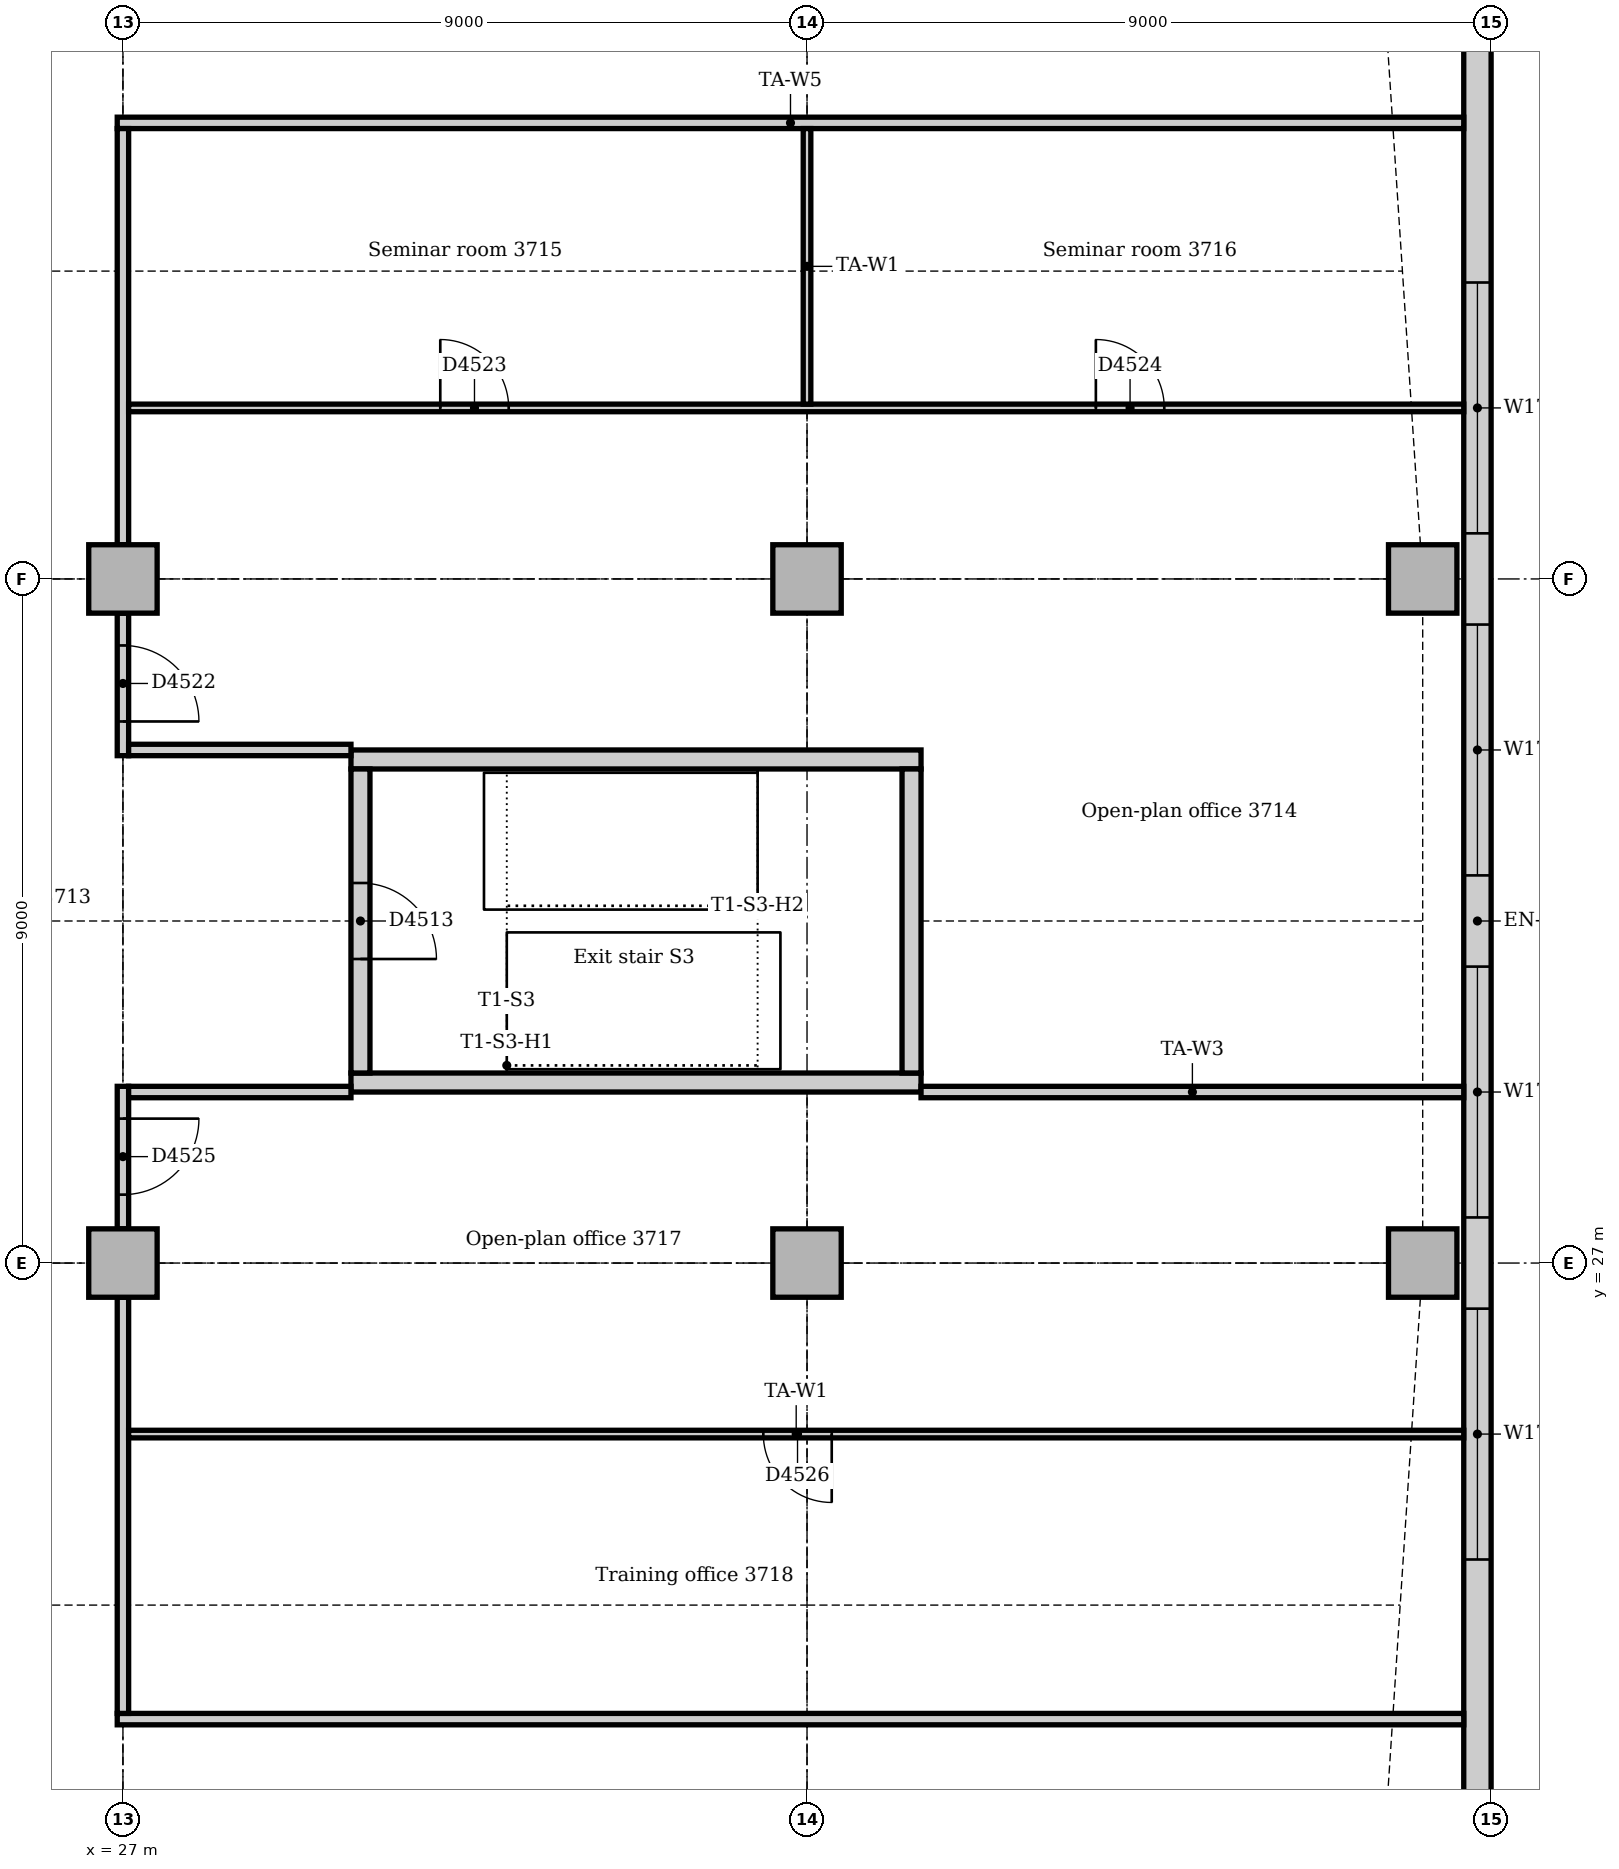
"""IFC4 building model, lengths in metres.
Left out: names, types, materials, properties, quantities, classifications, styles, units other than length and angle.
Written with IfcOpenShell. Run it as: python <this file> out.ifc"""

import sys

from ifc_helpers import new_model, si_unit, direction, frame, frame_2d, origin, origin_2d, place, context, subcontext, project, spatial, rectangle, extrude, element, fill, save


model = new_model("IFC4")
c1 = context("Model", 3, precision=1e-05, world=origin(), true_north=direction((0.0, 1.0)))
c2 = subcontext(c1, "Body", "Model", "MODEL_VIEW")
j1 = project(units=[si_unit("LENGTHUNIT", "METRE"), si_unit("PLANEANGLEUNIT", "RADIAN")], contexts=[c1])
p1 = place(None, origin())
s1 = spatial("IfcSite", under=j1, at=p1, CompositionType="ELEMENT")
p2 = place(p1, origin())
s2 = spatial("IfcBuilding", under=s1, at=p2, CompositionType="ELEMENT")
p3 = place(p2, frame((0.0, 0.0, 157.0)))
s3 = spatial("IfcBuildingStorey", under=s2, at=p3, CompositionType="ELEMENT", Elevation=157.0)
for number, where, z_axis, x_axis in (
    (1, (30.0, 29.375, 0.0), (0.0, 0.0, 1.0), (1.0, 0.0, 0.0)),
    (2, (37.5, 33.625, 0.0), (0.0, 0.0, 1.0), (-1.0, 0.0, 0.0)),
):
    element("IfcWall", number, at=place(p3, frame(where, z_axis=z_axis, x_axis=x_axis)), inside=s3, PredefinedType="SOLIDWALL", context=c2, shape_type="SweptSolid", body=[
        extrude(rectangle(XDim=7.5, YDim=0.25, at=frame_2d((3.75, 0.0))), origin(), (0.0, 0.0, 1.0), 4.0),
    ])
p4 = place(p3, frame((37.375, 29.5, 0.0), z_axis=(0.0, 0.0, 1.0), x_axis=(0.0, 1.0, 0.0)))
e3 = element("IfcWall", 3, at=p4, inside=s3, PredefinedType="SOLIDWALL", context=c2, shape_type="SweptSolid", body=[
    extrude(rectangle(XDim=4.0, YDim=0.25, at=frame_2d((2.0, 0.0))), origin(), (0.0, 0.0, 1.0), 4.0),
])
p5 = place(p3, frame((30.125, 33.5, 0.0), z_axis=(0.0, 0.0, 1.0), x_axis=(0.0, -1.0, 0.0)))
e4 = element("IfcWall", 4, at=p5, inside=s3, PredefinedType="SOLIDWALL", context=c2, shape_type="SweptSolid", body=[
    extrude(rectangle(XDim=4.0, YDim=0.25, at=frame_2d((2.0, 0.0))), origin(), (0.0, 0.0, 1.0), 4.0),
])
p6 = place(p5, frame((1.5, 0.0, 0.0)))
e5 = element("IfcOpeningElement", 5, at=p6, cuts=e4, PredefinedType="OPENING", context=c2, shape_type="SweptSolid", body=[
    extrude(rectangle(XDim=1.0, YDim=2.1, at=frame_2d((0.5, 1.05))), frame((0.0, 0.135, 0.0), z_axis=(0.0, -1.0, 0.0), x_axis=(1.0, 0.0, 0.0)), (0.0, 0.0, 1.0), 0.27),
])
for number, where, z_axis, x_axis in (
    (6, (44.1, 27.0, 0.0), (0.0, 0.0, 1.0), (1.0, 0.0, 0.0)),
    (7, (44.1, 36.0, 0.0), (0.0, 0.0, 1.0), (1.0, 0.0, 0.0)),
    (8, (27.0, 27.0, 0.0), (0.0, 0.0, 1.0), (1.0, 0.0, 0.0)),
    (9, (27.0, 36.0, 0.0), (0.0, 0.0, 1.0), (1.0, 0.0, 0.0)),
    (10, (36.0, 27.0, 0.0), (0.0, 0.0, 1.0), (1.0, 0.0, 0.0)),
    (11, (36.0, 36.0, 0.0), (0.0, 0.0, 1.0), (1.0, 0.0, 0.0)),
):
    element("IfcColumn", number, at=place(p3, frame(where, z_axis=z_axis, x_axis=x_axis)), inside=s3, PredefinedType="COLUMN", context=c2, shape_type="SweptSolid", body=[
        extrude(rectangle(XDim=0.9, YDim=0.9, at=origin_2d()), origin(), (0.0, 0.0, 1.0), 3.85),
    ])
p7 = place(p3, frame((44.82, 19.243, 0.0), z_axis=(0.0, 0.0, 1.0), x_axis=(0.0, 1.0, 0.0)))
e12 = element("IfcWall", 12, at=p7, inside=s3, PredefinedType="STANDARD", context=c2, shape_type="SweptSolid", body=[
    extrude(rectangle(XDim=24.515, YDim=0.36, at=frame_2d((12.257, 0.0))), origin(), (0.0, 0.0, 1.0), 3.85),
])
p8 = place(p7, frame((3.857, 0.0, 0.9)))
e13 = element("IfcOpeningElement", 13, at=p8, cuts=e12, PredefinedType="OPENING", context=c2, shape_type="SweptSolid", body=[
    extrude(rectangle(XDim=3.3, YDim=1.6, at=frame_2d((1.65, 0.8))), frame((0.0, 0.19, 0.0), z_axis=(0.0, -1.0, 0.0), x_axis=(1.0, 0.0, 0.0)), (0.0, 0.0, 1.0), 0.38),
])
p9 = place(p7, frame((8.357, 0.0, 0.9)))
e14 = element("IfcOpeningElement", 14, at=p9, cuts=e12, PredefinedType="OPENING", context=c2, shape_type="SweptSolid", body=[
    extrude(rectangle(XDim=3.3, YDim=1.6, at=frame_2d((1.65, 0.8))), frame((0.0, 0.19, 0.0), z_axis=(0.0, -1.0, 0.0), x_axis=(1.0, 0.0, 0.0)), (0.0, 0.0, 1.0), 0.38),
])
p10 = place(p7, frame((12.857, 0.0, 0.9)))
e15 = element("IfcOpeningElement", 15, at=p10, cuts=e12, PredefinedType="OPENING", context=c2, shape_type="SweptSolid", body=[
    extrude(rectangle(XDim=3.3, YDim=1.6, at=frame_2d((1.65, 0.8))), frame((0.0, 0.19, 0.0), z_axis=(0.0, -1.0, 0.0), x_axis=(1.0, 0.0, 0.0)), (0.0, 0.0, 1.0), 0.38),
])
p11 = place(p7, frame((17.357, 0.0, 0.9)))
e16 = element("IfcOpeningElement", 16, at=p11, cuts=e12, PredefinedType="OPENING", context=c2, shape_type="SweptSolid", body=[
    extrude(rectangle(XDim=3.3, YDim=1.6, at=frame_2d((1.65, 0.8))), frame((0.0, 0.19, 0.0), z_axis=(0.0, -1.0, 0.0), x_axis=(1.0, 0.0, 0.0)), (0.0, 0.0, 1.0), 0.38),
])
for number, where, z_axis, x_axis in (
    (17, (26.925, 21.0, 0.0), (0.0, 0.0, 1.0), (1.0, 0.0, 0.0)),
    (18, (26.925, 42.0, 0.0), (0.0, 0.0, 1.0), (1.0, 0.0, 0.0)),
):
    element("IfcWall", number, at=place(p3, frame(where, z_axis=z_axis, x_axis=x_axis)), inside=s3, PredefinedType="PARTITIONING", context=c2, shape_type="SweptSolid", body=[
        extrude(rectangle(XDim=17.715, YDim=0.15, at=frame_2d((8.857, 0.0))), origin(), (0.0, 0.0, 1.0), 3.85),
    ])
p12 = place(p3, frame((27.0, 21.075, 0.0), z_axis=(0.0, 0.0, 1.0), x_axis=(0.0, 1.0, 0.0)))
e19 = element("IfcWall", 19, at=p12, inside=s3, PredefinedType="PARTITIONING", context=c2, shape_type="SweptSolid", body=[
    extrude(rectangle(XDim=5.475, YDim=0.15, at=frame_2d((2.737, 0.0))), origin(), (0.0, 0.0, 1.0), 3.362),
])
p13 = place(p3, frame((27.0, 27.45, 0.0), z_axis=(0.0, 0.0, 1.0), x_axis=(0.0, 1.0, 0.0)))
e20 = element("IfcWall", 20, at=p13, inside=s3, PredefinedType="PARTITIONING", context=c2, shape_type="SweptSolid", body=[
    extrude(rectangle(XDim=1.875, YDim=0.15, at=frame_2d((0.938, 0.0))), origin(), (0.0, 0.0, 1.0), 3.362),
])
p14 = place(p13, frame((0.45, 0.0, 0.0)))
e21 = element("IfcOpeningElement", 21, at=p14, cuts=e20, PredefinedType="OPENING", context=c2, shape_type="SweptSolid", body=[
    extrude(rectangle(XDim=1.0, YDim=2.1, at=frame_2d((0.5, 1.05))), frame((0.0, 0.085, 0.0), z_axis=(0.0, -1.0, 0.0), x_axis=(1.0, 0.0, 0.0)), (0.0, 0.0, 1.0), 0.17),
])
p15 = place(p3, frame((27.0, 33.675, 0.0), z_axis=(0.0, 0.0, 1.0), x_axis=(0.0, 1.0, 0.0)))
e22 = element("IfcWall", 22, at=p15, inside=s3, PredefinedType="PARTITIONING", context=c2, shape_type="SweptSolid", body=[
    extrude(rectangle(XDim=1.875, YDim=0.15, at=frame_2d((0.938, 0.0))), origin(), (0.0, 0.0, 1.0), 3.362),
])
p16 = place(p15, frame((0.45, 0.0, 0.0)))
e23 = element("IfcOpeningElement", 23, at=p16, cuts=e22, PredefinedType="OPENING", context=c2, shape_type="SweptSolid", body=[
    extrude(rectangle(XDim=1.0, YDim=2.1, at=frame_2d((0.5, 1.05))), frame((0.0, 0.085, 0.0), z_axis=(0.0, -1.0, 0.0), x_axis=(1.0, 0.0, 0.0)), (0.0, 0.0, 1.0), 0.17),
])
p17 = place(p3, frame((27.0, 36.45, 0.0), z_axis=(0.0, 0.0, 1.0), x_axis=(0.0, 1.0, 0.0)))
e24 = element("IfcWall", 24, at=p17, inside=s3, PredefinedType="PARTITIONING", context=c2, shape_type="SweptSolid", body=[
    extrude(rectangle(XDim=5.475, YDim=0.15, at=frame_2d((2.737, 0.0))), origin(), (0.0, 0.0, 1.0), 3.362),
])
for number, where, z_axis, x_axis in (
    (25, (27.075, 29.25, 0.0), (0.0, 0.0, 1.0), (1.0, 0.0, 0.0)),
    (26, (27.075, 33.75, 0.0), (0.0, 0.0, 1.0), (1.0, 0.0, 0.0)),
):
    element("IfcWall", number, at=place(p3, frame(where, z_axis=z_axis, x_axis=x_axis)), inside=s3, PredefinedType="PARTITIONING", context=c2, shape_type="SweptSolid", body=[
        extrude(rectangle(XDim=2.925, YDim=0.15, at=frame_2d((1.462, 0.0))), origin(), (0.0, 0.0, 1.0), 3.85),
    ])
p18 = place(p3, frame((37.5, 29.25, 0.0), z_axis=(0.0, 0.0, 1.0), x_axis=(1.0, 0.0, 0.0)))
e27 = element("IfcWall", 27, at=p18, inside=s3, PredefinedType="PARTITIONING", context=c2, shape_type="SweptSolid", body=[
    extrude(rectangle(XDim=7.14, YDim=0.15, at=frame_2d((3.57, 0.0))), origin(), (0.0, 0.0, 1.0), 3.85),
])
p19 = place(p3, frame((27.075, 24.75, 0.0), z_axis=(0.0, 0.0, 1.0), x_axis=(1.0, 0.0, 0.0)))
e28 = element("IfcWall", 28, at=p19, inside=s3, PredefinedType="PARTITIONING", context=c2, shape_type="SweptSolid", body=[
    extrude(rectangle(XDim=17.565, YDim=0.1, at=frame_2d((8.783, 0.0))), origin(), (0.0, 0.0, 1.0), 3.85),
])
p20 = place(p19, frame((8.35, 0.0, 0.0)))
e29 = element("IfcOpeningElement", 29, at=p20, cuts=e28, PredefinedType="OPENING", context=c2, shape_type="SweptSolid", body=[
    extrude(rectangle(XDim=0.9, YDim=2.1, at=frame_2d((0.45, 1.05))), frame((0.0, 0.06, 0.0), z_axis=(0.0, -1.0, 0.0), x_axis=(1.0, 0.0, 0.0)), (0.0, 0.0, 1.0), 0.12),
])
p21 = place(p3, frame((27.075, 38.25, 0.0), z_axis=(0.0, 0.0, 1.0), x_axis=(1.0, 0.0, 0.0)))
e30 = element("IfcWall", 30, at=p21, inside=s3, PredefinedType="PARTITIONING", context=c2, shape_type="SweptSolid", body=[
    extrude(rectangle(XDim=17.565, YDim=0.1, at=frame_2d((8.783, 0.0))), origin(), (0.0, 0.0, 1.0), 3.85),
])
p22 = place(p21, frame((4.1, 0.0, 0.0)))
e31 = element("IfcOpeningElement", 31, at=p22, cuts=e30, PredefinedType="OPENING", context=c2, shape_type="SweptSolid", body=[
    extrude(rectangle(XDim=0.9, YDim=2.1, at=frame_2d((0.45, 1.05))), frame((0.0, 0.06, 0.0), z_axis=(0.0, -1.0, 0.0), x_axis=(1.0, 0.0, 0.0)), (0.0, 0.0, 1.0), 0.12),
])
p23 = place(p21, frame((12.725, 0.0, 0.0)))
e32 = element("IfcOpeningElement", 32, at=p23, cuts=e30, PredefinedType="OPENING", context=c2, shape_type="SweptSolid", body=[
    extrude(rectangle(XDim=0.9, YDim=2.1, at=frame_2d((0.45, 1.05))), frame((0.0, 0.06, 0.0), z_axis=(0.0, -1.0, 0.0), x_axis=(1.0, 0.0, 0.0)), (0.0, 0.0, 1.0), 0.12),
])
p24 = place(p3, frame((36.0, 38.3, 0.0), z_axis=(0.0, 0.0, 1.0), x_axis=(0.0, 1.0, 0.0)))
e33 = element("IfcWall", 33, at=p24, inside=s3, PredefinedType="PARTITIONING", context=c2, shape_type="SweptSolid", body=[
    extrude(rectangle(XDim=3.625, YDim=0.1, at=frame_2d((1.812, 0.0))), origin(), (0.0, 0.0, 1.0), 3.362),
])
p25 = place(p8, origin())
e34 = element("IfcWindow", 34, at=p25, inside=s3, PartitioningType="SINGLE_PANEL", PredefinedType="WINDOW", context=c2, shape_type="SweptSolid", body=[
    extrude(rectangle(XDim=3.3, YDim=1.6, at=frame_2d((1.65, 0.8))), frame((0.0, 0.13, 0.0), z_axis=(0.0, -1.0, 0.0), x_axis=(1.0, 0.0, 0.0)), (0.0, 0.0, 1.0), 0.06),
])
fill(e13, e34)
p26 = place(p9, origin())
e35 = element("IfcWindow", 35, at=p26, inside=s3, PartitioningType="SINGLE_PANEL", PredefinedType="WINDOW", context=c2, shape_type="SweptSolid", body=[
    extrude(rectangle(XDim=3.3, YDim=1.6, at=frame_2d((1.65, 0.8))), frame((0.0, 0.13, 0.0), z_axis=(0.0, -1.0, 0.0), x_axis=(1.0, 0.0, 0.0)), (0.0, 0.0, 1.0), 0.06),
])
fill(e14, e35)
p27 = place(p10, origin())
e36 = element("IfcWindow", 36, at=p27, inside=s3, PartitioningType="SINGLE_PANEL", PredefinedType="WINDOW", context=c2, shape_type="SweptSolid", body=[
    extrude(rectangle(XDim=3.3, YDim=1.6, at=frame_2d((1.65, 0.8))), frame((0.0, 0.13, 0.0), z_axis=(0.0, -1.0, 0.0), x_axis=(1.0, 0.0, 0.0)), (0.0, 0.0, 1.0), 0.06),
])
fill(e15, e36)
p28 = place(p11, origin())
e37 = element("IfcWindow", 37, at=p28, inside=s3, PartitioningType="SINGLE_PANEL", PredefinedType="WINDOW", context=c2, shape_type="SweptSolid", body=[
    extrude(rectangle(XDim=3.3, YDim=1.6, at=frame_2d((1.65, 0.8))), frame((0.0, 0.13, 0.0), z_axis=(0.0, -1.0, 0.0), x_axis=(1.0, 0.0, 0.0)), (0.0, 0.0, 1.0), 0.06),
])
fill(e16, e37)
p29 = place(p6, origin())
e38 = element("IfcDoor", 38, at=p29, inside=s3, OperationType="SINGLE_SWING_RIGHT", PredefinedType="DOOR", context=c2, shape_type="SweptSolid", body=[
    extrude(rectangle(XDim=1.0, YDim=2.1, at=frame_2d((0.5, 1.05))), frame((0.0, 0.025, 0.0), z_axis=(0.0, -1.0, 0.0), x_axis=(1.0, 0.0, 0.0)), (0.0, 0.0, 1.0), 0.05),
])
fill(e5, e38)
p30 = place(p16, frame((1.0, 0.0, 0.0), z_axis=(0.0, 0.0, 1.0), x_axis=(-1.0, 0.0, 0.0)))
e39 = element("IfcDoor", 39, at=p30, inside=s3, OperationType="SINGLE_SWING_RIGHT", PredefinedType="DOOR", context=c2, shape_type="SweptSolid", body=[
    extrude(rectangle(XDim=1.0, YDim=2.1, at=frame_2d((0.5, 1.05))), frame((0.0, 0.025, 0.0), z_axis=(0.0, -1.0, 0.0), x_axis=(1.0, 0.0, 0.0)), (0.0, 0.0, 1.0), 0.05),
])
fill(e23, e39)
p31 = place(p22, origin())
e40 = element("IfcDoor", 40, at=p31, inside=s3, OperationType="SINGLE_SWING_LEFT", PredefinedType="DOOR", context=c2, shape_type="SweptSolid", body=[
    extrude(rectangle(XDim=0.9, YDim=2.1, at=frame_2d((0.45, 1.05))), frame((0.0, 0.025, 0.0), z_axis=(0.0, -1.0, 0.0), x_axis=(1.0, 0.0, 0.0)), (0.0, 0.0, 1.0), 0.05),
])
fill(e31, e40)
p32 = place(p23, origin())
e41 = element("IfcDoor", 41, at=p32, inside=s3, OperationType="SINGLE_SWING_LEFT", PredefinedType="DOOR", context=c2, shape_type="SweptSolid", body=[
    extrude(rectangle(XDim=0.9, YDim=2.1, at=frame_2d((0.45, 1.05))), frame((0.0, 0.025, 0.0), z_axis=(0.0, -1.0, 0.0), x_axis=(1.0, 0.0, 0.0)), (0.0, 0.0, 1.0), 0.05),
])
fill(e32, e41)
p33 = place(p14, frame((1.0, 0.0, 0.0), z_axis=(0.0, 0.0, 1.0), x_axis=(-1.0, 0.0, 0.0)))
e42 = element("IfcDoor", 42, at=p33, inside=s3, OperationType="SINGLE_SWING_LEFT", PredefinedType="DOOR", context=c2, shape_type="SweptSolid", body=[
    extrude(rectangle(XDim=1.0, YDim=2.1, at=frame_2d((0.5, 1.05))), frame((0.0, 0.025, 0.0), z_axis=(0.0, -1.0, 0.0), x_axis=(1.0, 0.0, 0.0)), (0.0, 0.0, 1.0), 0.05),
])
fill(e21, e42)
p34 = place(p20, frame((0.9, 0.0, 0.0), z_axis=(0.0, 0.0, 1.0), x_axis=(-1.0, 0.0, 0.0)))
e43 = element("IfcDoor", 43, at=p34, inside=s3, OperationType="SINGLE_SWING_LEFT", PredefinedType="DOOR", context=c2, shape_type="SweptSolid", body=[
    extrude(rectangle(XDim=0.9, YDim=2.1, at=frame_2d((0.45, 1.05))), frame((0.0, 0.025, 0.0), z_axis=(0.0, -1.0, 0.0), x_axis=(1.0, 0.0, 0.0)), (0.0, 0.0, 1.0), 0.05),
])
fill(e29, e43)
save(model, sys.argv[1])
